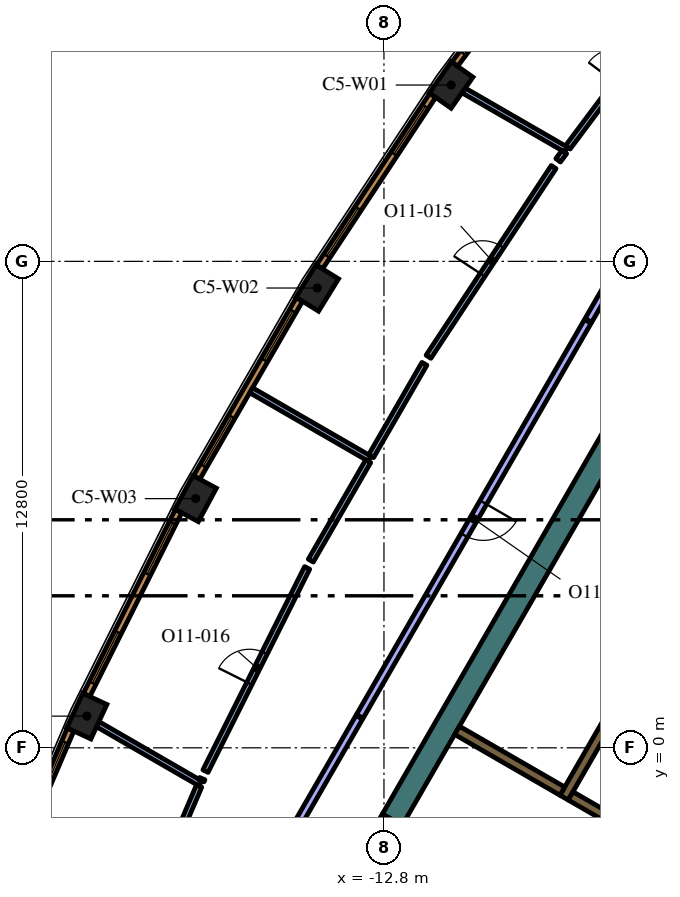
"""IFC4 building model, lengths in metres.
Left out: names, types, materials, properties, quantities, classifications, styles, units other than length and angle.
Written with IfcOpenShell. Run it as: python <this file> out.ifc"""

import sys

from ifc_helpers import new_model, si_unit, direction, frame, frame_2d, origin, origin_2d, place, context, subcontext, project, spatial, rectangle, extrude, element, fill, save


model = new_model("IFC4")
c1 = context("Model", 3, precision=1e-05, world=origin(), true_north=direction((0.0, 1.0)))
c2 = subcontext(c1, "Body", "Model", "MODEL_VIEW")
j1 = project(units=[si_unit("LENGTHUNIT", "METRE"), si_unit("PLANEANGLEUNIT", "RADIAN")], contexts=[c1])
p1 = place(None, origin())
s1 = spatial("IfcSite", under=j1, at=p1, CompositionType="ELEMENT")
p2 = place(p1, origin())
s2 = spatial("IfcBuilding", under=s1, at=p2, CompositionType="ELEMENT")
p3 = place(p2, frame((0.0, 0.0, 271.2)))
s3 = spatial("IfcBuildingStorey", under=s2, at=p3, CompositionType="ELEMENT", Elevation=271.2)
for number, where, z_axis, x_axis in (
    (1, (-11.032, 17.44, 0.0), (0.0, 0.0, 1.0), (-0.575, -0.818, 0.0)),
    (2, (-14.556, 12.098, 0.0), (0.0, 0.0, 1.0), (-0.526, -0.851, 0.0)),
    (3, (-17.756, 6.557, 0.0), (0.0, 0.0, 1.0), (-0.474, -0.881, 0.0)),
    (4, (-20.619, 0.834, 0.0), (0.0, 0.0, 1.0), (-0.421, -0.907, 0.0)),
):
    element("IfcColumn", number, at=place(p3, frame(where, z_axis=z_axis, x_axis=x_axis)), inside=s3, PredefinedType="COLUMN", context=c2, shape_type="SweptSolid", body=[
        extrude(rectangle(XDim=1.0, YDim=0.7, at=origin_2d()), origin(), (0.0, 0.0, 1.0), 4.2),
    ])
p4 = place(p3, frame((-4.234, 12.566, 0.0), z_axis=(0.0, 0.0, 1.0), x_axis=(-0.499998841866, -0.866026072432, 0.0)))
e5 = element("IfcWall", 5, at=p4, inside=s3, PredefinedType="SOLIDWALL", context=c2, shape_type="SweptSolid", body=[
    extrude(rectangle(XDim=16.694, YDim=0.6, at=frame_2d((8.347, 0.0))), origin(), (0.0, 0.0, 1.0), 4.2),
])
p5 = place(p3, frame((-3.02, 7.419, 0.0), z_axis=(0.0, 0.0, 1.0), x_axis=(-0.500022956343, -0.866012149528, 0.0)))
e6 = element("IfcWall", 6, at=p5, inside=s3, PredefinedType="SOLIDWALL", context=c2, shape_type="SweptSolid", body=[
    extrude(rectangle(XDim=10.08, YDim=0.25, at=frame_2d((5.04, 0.0))), origin(), (0.0, 0.0, 1.0), 4.2),
])
p6 = place(p3, frame((-7.889, -1.265, 0.0), z_axis=(0.0, 0.0, 1.0), x_axis=(0.865986741702, -0.500066958712, 0.0)))
e7 = element("IfcWall", 7, at=p6, inside=s3, PredefinedType="SOLIDWALL", context=c2, shape_type="SweptSolid", body=[
    extrude(rectangle(XDim=1.738, YDim=0.25, at=frame_2d((0.869, 0.0))), origin(), (0.0, 0.0, 1.0), 4.2),
])
p7 = place(p3, frame((-8.106, -1.14, 0.0), z_axis=(0.0, 0.0, 1.0), x_axis=(-0.866008981251, 0.500028443584, 0.0)))
e8 = element("IfcWall", 8, at=p7, inside=s3, PredefinedType="SOLIDWALL", context=c2, shape_type="SweptSolid", body=[
    extrude(rectangle(XDim=3.2, YDim=0.25, at=frame_2d((1.6, 0.0))), origin(), (0.0, 0.0, 1.0), 4.2),
])
p8 = place(p3, frame((-13.432, -3.364, 0.0), z_axis=(0.0, 0.0, 1.0), x_axis=(0.500000056704, 0.866025371046, 0.0)))
e9 = element("IfcWall", 9, at=p8, inside=s3, PredefinedType="SOLIDWALL", context=c2, shape_type="SweptSolid", body=[
    extrude(rectangle(XDim=1.7, YDim=0.6, at=frame_2d((0.85, 0.0))), origin(), (0.0, 0.0, 1.0), 4.2),
])
p9 = place(p8, frame((0.25, 0.0, 0.0)))
e10 = element("IfcOpeningElement", 10, at=p9, cuts=e9, PredefinedType="OPENING", context=c2, shape_type="SweptSolid", body=[
    extrude(rectangle(XDim=1.2, YDim=2.1, at=frame_2d((0.6, 1.05))), frame((0.0, 0.31, 0.0), z_axis=(0.0, -1.0, 0.0), x_axis=(1.0, 0.0, 0.0)), (0.0, 0.0, 1.0), 0.62),
])
p10 = place(p3, frame((-8.007, 15.74, 0.0), z_axis=(0.0, 0.0, 1.0), x_axis=(-0.866044607523, 0.499966736674, 0.0)))
e11 = element("IfcWall", 11, at=p10, inside=s3, PredefinedType="PARTITIONING", context=c2, shape_type="SweptSolid", body=[
    extrude(rectangle(XDim=3.115, YDim=0.15, at=frame_2d((1.557, 0.0))), origin(), (0.0, 0.0, 1.0), 3.55),
])
p11 = place(p3, frame((-7.962, 15.8, 0.0), z_axis=(0.0, 0.0, 1.0), x_axis=(0.599528135832, 0.800353680785, 0.0)))
e12 = element("IfcWall", 12, at=p11, inside=s3, PredefinedType="PARTITIONING", context=c2, shape_type="SweptSolid", body=[
    extrude(rectangle(XDim=5.217, YDim=0.15, at=frame_2d((2.608, 0.0))), origin(), (0.0, 0.0, 1.0), 3.55),
])
p12 = place(p11, frame((2.116, 0.0, 0.0)))
e13 = element("IfcOpeningElement", 13, at=p12, cuts=e12, PredefinedType="OPENING", context=c2, shape_type="SweptSolid", body=[
    extrude(rectangle(XDim=0.9, YDim=2.1, at=frame_2d((0.45, 1.05))), frame((0.0, 0.085, 0.0), z_axis=(0.0, -1.0, 0.0), x_axis=(1.0, 0.0, 0.0)), (0.0, 0.0, 1.0), 0.17),
])
p13 = place(p3, frame((-13.177, 7.608, 0.0), z_axis=(0.0, 0.0, 1.0), x_axis=(-0.866018442252, 0.500012057535, 0.0)))
e14 = element("IfcWall", 14, at=p13, inside=s3, PredefinedType="PARTITIONING", context=c2, shape_type="SweptSolid", body=[
    extrude(rectangle(XDim=3.6, YDim=0.15, at=frame_2d((1.8, 0.0))), origin(), (0.0, 0.0, 1.0), 3.55),
])
p14 = place(p3, frame((-8.052, 15.679, 0.0), z_axis=(0.0, 0.0, 1.0), x_axis=(-0.599004157744, -0.800745914136, 0.0)))
e15 = element("IfcWall", 15, at=p14, inside=s3, PredefinedType="PARTITIONING", context=c2, shape_type="SweptSolid", body=[
    extrude(rectangle(XDim=0.275, YDim=0.15, at=frame_2d((0.137, 0.0))), origin(), (0.0, 0.0, 1.0), 3.55),
])
p15 = place(p3, frame((-11.628, 10.29, 0.0), z_axis=(0.0, 0.0, 1.0), x_axis=(0.55074607557, 0.834672846236, 0.0)))
e16 = element("IfcWall", 16, at=p15, inside=s3, PredefinedType="PARTITIONING", context=c2, shape_type="SweptSolid", body=[
    extrude(rectangle(XDim=5.979, YDim=0.15, at=frame_2d((2.99, 0.0))), origin(), (0.0, 0.0, 1.0), 3.55),
])
p16 = place(p15, frame((2.58, 0.0, 0.0)))
e17 = element("IfcOpeningElement", 17, at=p16, cuts=e16, PredefinedType="OPENING", context=c2, shape_type="SweptSolid", body=[
    extrude(rectangle(XDim=0.9, YDim=2.1, at=frame_2d((0.45, 1.05))), frame((0.0, 0.085, 0.0), z_axis=(0.0, -1.0, 0.0), x_axis=(1.0, 0.0, 0.0)), (0.0, 0.0, 1.0), 0.17),
])
p17 = place(p3, frame((-11.736, 10.104, 0.0), z_axis=(0.0, 0.0, 1.0), x_axis=(-0.500011000363, -0.866019052629, 0.0)))
e18 = element("IfcWall", 18, at=p17, inside=s3, PredefinedType="PARTITIONING", context=c2, shape_type="SweptSolid", body=[
    extrude(rectangle(XDim=2.808, YDim=0.15, at=frame_2d((1.404, 0.0))), origin(), (0.0, 0.0, 1.0), 3.55),
])
p18 = place(p3, frame((-17.635, -0.936, 0.0), z_axis=(0.0, 0.0, 1.0), x_axis=(-0.866044607523, 0.499966736674, 0.0)))
e19 = element("IfcWall", 19, at=p18, inside=s3, PredefinedType="PARTITIONING", context=c2, shape_type="SweptSolid", body=[
    extrude(rectangle(XDim=3.115, YDim=0.15, at=frame_2d((1.557, 0.0))), origin(), (0.0, 0.0, 1.0), 3.55),
])
p19 = place(p3, frame((-13.214, 7.543, 0.0), z_axis=(0.0, 0.0, 1.0), x_axis=(-0.499927597274, -0.866067201483, 0.0)))
e20 = element("IfcWall", 20, at=p19, inside=s3, PredefinedType="PARTITIONING", context=c2, shape_type="SweptSolid", body=[
    extrude(rectangle(XDim=3.022, YDim=0.15, at=frame_2d((1.511, 0.0))), origin(), (0.0, 0.0, 1.0), 3.55),
])
p20 = place(p3, frame((-17.497, -0.613, 0.0), z_axis=(0.0, 0.0, 1.0), x_axis=(0.447474899467, 0.894296491297, 0.0)))
e21 = element("IfcWall", 21, at=p20, inside=s3, PredefinedType="PARTITIONING", context=c2, shape_type="SweptSolid", body=[
    extrude(rectangle(XDim=5.979, YDim=0.15, at=frame_2d((2.99, 0.0))), origin(), (0.0, 0.0, 1.0), 3.55),
])
p21 = place(p20, frame((2.58, 0.0, 0.0)))
e22 = element("IfcOpeningElement", 22, at=p21, cuts=e21, PredefinedType="OPENING", context=c2, shape_type="SweptSolid", body=[
    extrude(rectangle(XDim=0.9, YDim=2.1, at=frame_2d((0.45, 1.05))), frame((0.0, 0.085, 0.0), z_axis=(0.0, -1.0, 0.0), x_axis=(1.0, 0.0, 0.0)), (0.0, 0.0, 1.0), 0.17),
])
p22 = place(p3, frame((-17.581, -0.81, 0.0), z_axis=(0.0, 0.0, 1.0), x_axis=(-0.390033474923, -0.92080067791, 0.0)))
e23 = element("IfcWall", 23, at=p22, inside=s3, PredefinedType="PARTITIONING", context=c2, shape_type="SweptSolid", body=[
    extrude(rectangle(XDim=0.061, YDim=0.15, at=frame_2d((0.03, 0.0))), origin(), (0.0, 0.0, 1.0), 3.55),
])
p23 = place(p3, frame((-19.8, -5.998, 0.0), z_axis=(0.0, 0.0, 1.0), x_axis=(0.39332238233, 0.919400621904, 0.0)))
e24 = element("IfcWall", 24, at=p23, inside=s3, PredefinedType="PARTITIONING", context=c2, shape_type="SweptSolid", body=[
    extrude(rectangle(XDim=5.431, YDim=0.15, at=frame_2d((2.715, 0.0))), origin(), (0.0, 0.0, 1.0), 3.55),
])
p24 = place(p23, frame((2.231, 0.0, 0.0)))
e25 = element("IfcOpeningElement", 25, at=p24, cuts=e24, PredefinedType="OPENING", context=c2, shape_type="SweptSolid", body=[
    extrude(rectangle(XDim=0.9, YDim=2.1, at=frame_2d((0.45, 1.05))), frame((0.0, 0.085, 0.0), z_axis=(0.0, -1.0, 0.0), x_axis=(1.0, 0.0, 0.0)), (0.0, 0.0, 1.0), 0.17),
])
p25 = place(p3, frame((-7.436, 11.221, 0.0), z_axis=(0.0, 0.0, 1.0), x_axis=(-0.49999894854, -0.866026010844, 0.0)))
e26 = element("IfcWall", 26, at=p25, inside=s3, PredefinedType="PARTITIONING", context=c2, shape_type="SweptSolid", body=[
    extrude(rectangle(XDim=12.0, YDim=0.2, at=frame_2d((6.0, 0.0))), origin(), (0.0, 0.0, 1.0), 3.55),
])
p26 = place(p25, frame((5.5, 0.0, 0.0)))
e27 = element("IfcOpeningElement", 27, at=p26, cuts=e26, PredefinedType="OPENING", context=c2, shape_type="SweptSolid", body=[
    extrude(rectangle(XDim=1.0, YDim=2.1, at=frame_2d((0.5, 1.05))), frame((0.0, 0.11, 0.0), z_axis=(0.0, -1.0, 0.0), x_axis=(1.0, 0.0, 0.0)), (0.0, 0.0, 1.0), 0.22),
])
p27 = place(p3, frame((-13.451, 0.803, 0.0), z_axis=(0.0, 0.0, 1.0), x_axis=(-0.499982585408, -0.86603545787, 0.0)))
e28 = element("IfcWall", 28, at=p27, inside=s3, PredefinedType="PARTITIONING", context=c2, shape_type="SweptSolid", body=[
    extrude(rectangle(XDim=8.26, YDim=0.2, at=frame_2d((4.13, 0.0))), origin(), (0.0, 0.0, 1.0), 3.55),
])
p28 = place(p3, frame((-3.306, 18.374, 0.0), z_axis=(0.0, 0.0, 1.0), x_axis=(-0.499999798456, -0.866025520146, 0.0)))
e29 = element("IfcWall", 29, at=p28, inside=s3, PredefinedType="PARTITIONING", context=c2, shape_type="SweptSolid", body=[
    extrude(rectangle(XDim=8.229, YDim=0.2, at=frame_2d((4.115, 0.0))), origin(), (0.0, 0.0, 1.0), 3.55),
])
p29 = place(p3, frame((-7.692, 22.324, 0.0), z_axis=(0.0, 0.0, 1.0), x_axis=(-0.599559865294, -0.800329911929, 0.0)))
e30 = element("IfcWall", 30, at=p29, inside=s3, PredefinedType="SOLIDWALL", context=c2, shape_type="SweptSolid", body=[
    extrude(rectangle(XDim=5.415, YDim=0.19, at=frame_2d((2.708, 0.0))), origin(), (0.0, 0.0, 1.0), 3.95),
])
p30 = place(p29, frame((0.323, 0.0, 0.6)))
e31 = element("IfcOpeningElement", 31, at=p30, cuts=e30, PredefinedType="OPENING", context=c2, shape_type="SweptSolid", body=[
    extrude(rectangle(XDim=1.5, YDim=2.85, at=frame_2d((0.75, 1.425))), frame((0.0, 0.105, 0.0), z_axis=(0.0, -1.0, 0.0), x_axis=(1.0, 0.0, 0.0)), (0.0, 0.0, 1.0), 0.21),
])
p31 = place(p29, frame((3.558, 0.0, 0.6)))
e32 = element("IfcOpeningElement", 32, at=p31, cuts=e30, PredefinedType="OPENING", context=c2, shape_type="SweptSolid", body=[
    extrude(rectangle(XDim=1.5, YDim=2.85, at=frame_2d((0.75, 1.425))), frame((0.0, 0.105, 0.0), z_axis=(0.0, -1.0, 0.0), x_axis=(1.0, 0.0, 0.0)), (0.0, 0.0, 1.0), 0.21),
])
p32 = place(p3, frame((-11.518, 17.166, 0.0), z_axis=(0.0, 0.0, 1.0), x_axis=(-0.550744054781, -0.83467417962, 0.0)))
e33 = element("IfcWall", 33, at=p32, inside=s3, PredefinedType="SOLIDWALL", context=c2, shape_type="SweptSolid", body=[
    extrude(rectangle(XDim=5.406, YDim=0.19, at=frame_2d((2.703, 0.0))), origin(), (0.0, 0.0, 1.0), 3.95),
])
p33 = place(p32, frame((0.346, 0.0, 0.6)))
e34 = element("IfcOpeningElement", 34, at=p33, cuts=e33, PredefinedType="OPENING", context=c2, shape_type="SweptSolid", body=[
    extrude(rectangle(XDim=1.5, YDim=2.85, at=frame_2d((0.75, 1.425))), frame((0.0, 0.105, 0.0), z_axis=(0.0, -1.0, 0.0), x_axis=(1.0, 0.0, 0.0)), (0.0, 0.0, 1.0), 0.21),
])
p34 = place(p32, frame((3.559, 0.0, 0.6)))
e35 = element("IfcOpeningElement", 35, at=p34, cuts=e33, PredefinedType="OPENING", context=c2, shape_type="SweptSolid", body=[
    extrude(rectangle(XDim=1.5, YDim=2.85, at=frame_2d((0.75, 1.425))), frame((0.0, 0.105, 0.0), z_axis=(0.0, -1.0, 0.0), x_axis=(1.0, 0.0, 0.0)), (0.0, 0.0, 1.0), 0.21),
])
p35 = place(p3, frame((-15.025, 11.796, 0.0), z_axis=(0.0, 0.0, 1.0), x_axis=(-0.500024767483, -0.866011103799, 0.0)))
e36 = element("IfcWall", 36, at=p35, inside=s3, PredefinedType="SOLIDWALL", context=c2, shape_type="SweptSolid", body=[
    extrude(rectangle(XDim=5.406, YDim=0.19, at=frame_2d((2.703, 0.0))), origin(), (0.0, 0.0, 1.0), 3.95),
])
p36 = place(p35, frame((0.346, 0.0, 0.6)))
e37 = element("IfcOpeningElement", 37, at=p36, cuts=e36, PredefinedType="OPENING", context=c2, shape_type="SweptSolid", body=[
    extrude(rectangle(XDim=1.5, YDim=2.85, at=frame_2d((0.75, 1.425))), frame((0.0, 0.105, 0.0), z_axis=(0.0, -1.0, 0.0), x_axis=(1.0, 0.0, 0.0)), (0.0, 0.0, 1.0), 0.21),
])
p37 = place(p35, frame((3.559, 0.0, 0.6)))
e38 = element("IfcOpeningElement", 38, at=p37, cuts=e36, PredefinedType="OPENING", context=c2, shape_type="SweptSolid", body=[
    extrude(rectangle(XDim=1.5, YDim=2.85, at=frame_2d((0.75, 1.425))), frame((0.0, 0.105, 0.0), z_axis=(0.0, -1.0, 0.0), x_axis=(1.0, 0.0, 0.0)), (0.0, 0.0, 1.0), 0.21),
])
p38 = place(p3, frame((-18.206, 6.227, 0.0), z_axis=(0.0, 0.0, 1.0), x_axis=(-0.447484531401, -0.894291671747, 0.0)))
e39 = element("IfcWall", 39, at=p38, inside=s3, PredefinedType="SOLIDWALL", context=c2, shape_type="SweptSolid", body=[
    extrude(rectangle(XDim=5.406, YDim=0.19, at=frame_2d((2.703, 0.0))), origin(), (0.0, 0.0, 1.0), 3.95),
])
p39 = place(p38, frame((0.346, 0.0, 0.6)))
e40 = element("IfcOpeningElement", 40, at=p39, cuts=e39, PredefinedType="OPENING", context=c2, shape_type="SweptSolid", body=[
    extrude(rectangle(XDim=1.5, YDim=2.85, at=frame_2d((0.75, 1.425))), frame((0.0, 0.105, 0.0), z_axis=(0.0, -1.0, 0.0), x_axis=(1.0, 0.0, 0.0)), (0.0, 0.0, 1.0), 0.21),
])
p40 = place(p38, frame((3.559, 0.0, 0.6)))
e41 = element("IfcOpeningElement", 41, at=p40, cuts=e39, PredefinedType="OPENING", context=c2, shape_type="SweptSolid", body=[
    extrude(rectangle(XDim=1.5, YDim=2.85, at=frame_2d((0.75, 1.425))), frame((0.0, 0.105, 0.0), z_axis=(0.0, -1.0, 0.0), x_axis=(1.0, 0.0, 0.0)), (0.0, 0.0, 1.0), 0.21),
])
p41 = place(p3, frame((-21.049, 0.478, 0.0), z_axis=(0.0, 0.0, 1.0), x_axis=(-0.393347848476, -0.919389726992, 0.0)))
e42 = element("IfcWall", 42, at=p41, inside=s3, PredefinedType="SOLIDWALL", context=c2, shape_type="SweptSolid", body=[
    extrude(rectangle(XDim=5.415, YDim=0.19, at=frame_2d((2.708, 0.0))), origin(), (0.0, 0.0, 1.0), 3.95),
])
p42 = place(p41, frame((0.357, 0.0, 0.6)))
e43 = element("IfcOpeningElement", 43, at=p42, cuts=e42, PredefinedType="OPENING", context=c2, shape_type="SweptSolid", body=[
    extrude(rectangle(XDim=1.5, YDim=2.85, at=frame_2d((0.75, 1.425))), frame((0.0, 0.105, 0.0), z_axis=(0.0, -1.0, 0.0), x_axis=(1.0, 0.0, 0.0)), (0.0, 0.0, 1.0), 0.21),
])
p43 = place(p41, frame((3.593, 0.0, 0.6)))
e44 = element("IfcOpeningElement", 44, at=p43, cuts=e42, PredefinedType="OPENING", context=c2, shape_type="SweptSolid", body=[
    extrude(rectangle(XDim=1.5, YDim=2.85, at=frame_2d((0.75, 1.425))), frame((0.0, 0.105, 0.0), z_axis=(0.0, -1.0, 0.0), x_axis=(1.0, 0.0, 0.0)), (0.0, 0.0, 1.0), 0.21),
])
p44 = place(p16, origin())
e45 = element("IfcDoor", 45, at=p44, inside=s3, OperationType="SINGLE_SWING_RIGHT", PredefinedType="DOOR", context=c2, shape_type="SweptSolid", body=[
    extrude(rectangle(XDim=0.9, YDim=2.1, at=frame_2d((0.45, 1.05))), frame((0.0, 0.025, 0.0), z_axis=(0.0, -1.0, 0.0), x_axis=(1.0, 0.0, 0.0)), (0.0, 0.0, 1.0), 0.05),
])
fill(e17, e45)
p45 = place(p21, origin())
e46 = element("IfcDoor", 46, at=p45, inside=s3, OperationType="SINGLE_SWING_RIGHT", PredefinedType="DOOR", context=c2, shape_type="SweptSolid", body=[
    extrude(rectangle(XDim=0.9, YDim=2.1, at=frame_2d((0.45, 1.05))), frame((0.0, 0.025, 0.0), z_axis=(0.0, -1.0, 0.0), x_axis=(1.0, 0.0, 0.0)), (0.0, 0.0, 1.0), 0.05),
])
fill(e22, e46)
p46 = place(p26, origin())
e47 = element("IfcDoor", 47, at=p46, inside=s3, OperationType="SINGLE_SWING_RIGHT", PredefinedType="DOOR", context=c2, shape_type="SweptSolid", body=[
    extrude(rectangle(XDim=1.0, YDim=2.1, at=frame_2d((0.5, 1.05))), frame((0.0, 0.025, 0.0), z_axis=(0.0, -1.0, 0.0), x_axis=(1.0, 0.0, 0.0)), (0.0, 0.0, 1.0), 0.05),
])
fill(e27, e47)
p47 = place(p31, origin())
e48 = element("IfcWindow", 48, at=p47, inside=s3, PartitioningType="SINGLE_PANEL", PredefinedType="WINDOW", context=c2, shape_type="SweptSolid", body=[
    extrude(rectangle(XDim=1.5, YDim=2.85, at=frame_2d((0.75, 1.425))), frame((0.0, 0.045, 0.0), z_axis=(0.0, -1.0, 0.0), x_axis=(1.0, 0.0, 0.0)), (0.0, 0.0, 1.0), 0.06),
])
fill(e32, e48)
p48 = place(p33, origin())
e49 = element("IfcWindow", 49, at=p48, inside=s3, PartitioningType="SINGLE_PANEL", PredefinedType="WINDOW", context=c2, shape_type="SweptSolid", body=[
    extrude(rectangle(XDim=1.5, YDim=2.85, at=frame_2d((0.75, 1.425))), frame((0.0, 0.045, 0.0), z_axis=(0.0, -1.0, 0.0), x_axis=(1.0, 0.0, 0.0)), (0.0, 0.0, 1.0), 0.06),
])
fill(e34, e49)
p49 = place(p34, origin())
e50 = element("IfcWindow", 50, at=p49, inside=s3, PartitioningType="SINGLE_PANEL", PredefinedType="WINDOW", context=c2, shape_type="SweptSolid", body=[
    extrude(rectangle(XDim=1.5, YDim=2.85, at=frame_2d((0.75, 1.425))), frame((0.0, 0.045, 0.0), z_axis=(0.0, -1.0, 0.0), x_axis=(1.0, 0.0, 0.0)), (0.0, 0.0, 1.0), 0.06),
])
fill(e35, e50)
p50 = place(p36, origin())
e51 = element("IfcWindow", 51, at=p50, inside=s3, PartitioningType="SINGLE_PANEL", PredefinedType="WINDOW", context=c2, shape_type="SweptSolid", body=[
    extrude(rectangle(XDim=1.5, YDim=2.85, at=frame_2d((0.75, 1.425))), frame((0.0, 0.045, 0.0), z_axis=(0.0, -1.0, 0.0), x_axis=(1.0, 0.0, 0.0)), (0.0, 0.0, 1.0), 0.06),
])
fill(e37, e51)
p51 = place(p37, origin())
e52 = element("IfcWindow", 52, at=p51, inside=s3, PartitioningType="SINGLE_PANEL", PredefinedType="WINDOW", context=c2, shape_type="SweptSolid", body=[
    extrude(rectangle(XDim=1.5, YDim=2.85, at=frame_2d((0.75, 1.425))), frame((0.0, 0.045, 0.0), z_axis=(0.0, -1.0, 0.0), x_axis=(1.0, 0.0, 0.0)), (0.0, 0.0, 1.0), 0.06),
])
fill(e38, e52)
p52 = place(p39, origin())
e53 = element("IfcWindow", 53, at=p52, inside=s3, PartitioningType="SINGLE_PANEL", PredefinedType="WINDOW", context=c2, shape_type="SweptSolid", body=[
    extrude(rectangle(XDim=1.5, YDim=2.85, at=frame_2d((0.75, 1.425))), frame((0.0, 0.045, 0.0), z_axis=(0.0, -1.0, 0.0), x_axis=(1.0, 0.0, 0.0)), (0.0, 0.0, 1.0), 0.06),
])
fill(e40, e53)
p53 = place(p40, origin())
e54 = element("IfcWindow", 54, at=p53, inside=s3, PartitioningType="SINGLE_PANEL", PredefinedType="WINDOW", context=c2, shape_type="SweptSolid", body=[
    extrude(rectangle(XDim=1.5, YDim=2.85, at=frame_2d((0.75, 1.425))), frame((0.0, 0.045, 0.0), z_axis=(0.0, -1.0, 0.0), x_axis=(1.0, 0.0, 0.0)), (0.0, 0.0, 1.0), 0.06),
])
fill(e41, e54)
p54 = place(p42, origin())
e55 = element("IfcWindow", 55, at=p54, inside=s3, PartitioningType="SINGLE_PANEL", PredefinedType="WINDOW", context=c2, shape_type="SweptSolid", body=[
    extrude(rectangle(XDim=1.5, YDim=2.85, at=frame_2d((0.75, 1.425))), frame((0.0, 0.045, 0.0), z_axis=(0.0, -1.0, 0.0), x_axis=(1.0, 0.0, 0.0)), (0.0, 0.0, 1.0), 0.06),
])
fill(e43, e55)
save(model, sys.argv[1])
